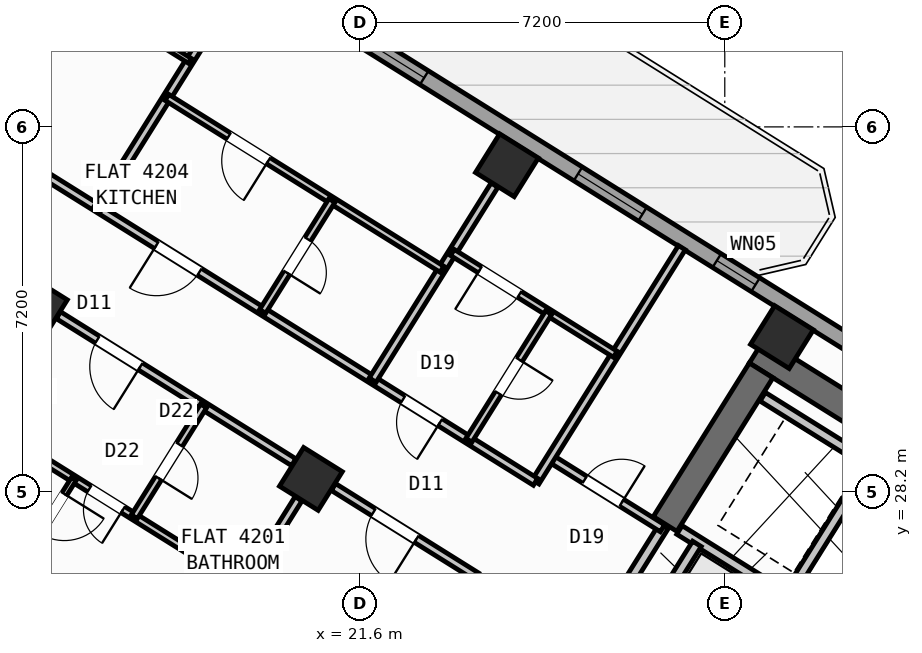
"""IFC4 building model, lengths in metres.
Left out: names, types, materials, properties, quantities, classifications, styles, units other than length and angle.
Written with IfcOpenShell. Run it as: python <this file> out.ifc"""

import sys

from ifc_helpers import new_model, si_unit, direction, frame, frame_2d, origin, origin_2d, place, context, subcontext, project, spatial, rectangle, hollow_rectangle, extrude, source, transform, mapped, element, fill, save


model = new_model("IFC4")
c1 = context("Model", 3, precision=1e-05, world=origin(), true_north=direction((0.0, 1.0)))
c2 = subcontext(c1, "Body", "Model", "MODEL_VIEW")
j1 = project(units=[si_unit("LENGTHUNIT", "METRE"), si_unit("PLANEANGLEUNIT", "RADIAN")], contexts=[c1])
p1 = place(None, origin())
s1 = spatial("IfcSite", under=j1, at=p1, CompositionType="ELEMENT")
p2 = place(p1, origin())
s2 = spatial("IfcBuilding", under=s1, at=p2, CompositionType="ELEMENT")
p3 = place(p2, frame((0.0, 0.0, 165.9)))
s3 = spatial("IfcBuildingStorey", under=s2, at=p3, CompositionType="ELEMENT", Elevation=165.9)
p4 = place(p3, frame((40.573, 24.01, 0.0), z_axis=(0.0, 0.0, 1.0), x_axis=(-0.848047359947, 0.529920442413, 0.0)))
e1 = element("IfcWall", 1, at=p4, inside=s3, PredefinedType="SHEAR", context=c2, shape_type="SweptSolid", body=[
    extrude(rectangle(XDim=13.14, YDim=0.55, at=frame_2d((6.57, 0.0))), origin(), (0.0, 0.0, 1.0), 3.32),
])
p5 = place(p3, frame((29.517, 30.594, 0.0), z_axis=(0.0, 0.0, 1.0), x_axis=(-0.529906864564, -0.848055844204, 0.0)))
e2 = element("IfcWall", 2, at=p5, inside=s3, PredefinedType="SHEAR", context=c2, shape_type="SweptSolid", body=[
    extrude(rectangle(XDim=3.575, YDim=0.55, at=frame_2d((1.788, 0.0))), origin(), (0.0, 0.0, 1.0), 3.32),
])
m1 = source(origin(), c2, "Body", "SweptSolid", [
    extrude(hollow_rectangle(XDim=0.9, YDim=0.9, WallThickness=0.036, at=origin_2d()), origin(), (0.0, 0.0, 1.0), 3.6),
])
for number, where, z_axis, x_axis in (
    (3, (29.928, 31.251, 0.0), (0.0, 0.0, 1.0), (-0.848, 0.53, 0.0)),
    (4, (24.5, 34.643, 0.0), (0.0, 0.0, 1.0), (-0.848, 0.53, 0.0)),
    (5, (20.632, 28.452, 0.0), (0.0, 0.0, 1.0), (-0.848, 0.53, 0.0)),
    (6, (15.205, 31.844, 0.0), (0.0, 0.0, 1.0), (-0.848, 0.53, 0.0)),
):
    element("IfcColumn", number, at=place(p3, frame(where, z_axis=z_axis, x_axis=x_axis)), inside=s3, PredefinedType="COLUMN", context=c2, shape_type="MappedRepresentation", body=[
        mapped(m1, transform((0.0, 0.0, 0.0), scale=1.0)),
    ])
p6 = place(p3, frame((14.138, 41.825, 0.0), z_axis=(0.0, 0.0, 1.0), x_axis=(0.848046498049, -0.529921821731, 0.0)))
e7 = element("IfcWall", 7, at=p6, inside=s3, PredefinedType="STANDARD", context=c2, shape_type="SweptSolid", body=[
    extrude(rectangle(XDim=31.588, YDim=0.32, at=frame_2d((15.794, 0.0))), origin(), (0.0, 0.0, 1.0), 3.32),
])
p7 = place(p6, frame((3.253, 0.0, 0.0)))
e8 = element("IfcOpeningElement", 8, at=p7, cuts=e7, PredefinedType="OPENING", context=c2, shape_type="SweptSolid", body=[
    extrude(rectangle(XDim=1.05, YDim=2.15, at=frame_2d((0.525, 1.075))), frame((0.0, 0.17, 0.0), z_axis=(0.0, -1.0, 0.0), x_axis=(1.0, 0.0, 0.0)), (0.0, 0.0, 1.0), 0.34),
])
p8 = place(p6, frame((0.863, 0.0, 0.85)))
e9 = element("IfcOpeningElement", 9, at=p8, cuts=e7, PredefinedType="OPENING", context=c2, shape_type="SweptSolid", body=[
    extrude(rectangle(XDim=1.8, YDim=1.5, at=frame_2d((0.9, 0.75))), frame((0.0, 0.17, 0.0), z_axis=(0.0, -1.0, 0.0), x_axis=(1.0, 0.0, 0.0)), (0.0, 0.0, 1.0), 0.34),
])
p9 = place(p6, frame((8.494, 0.0, 0.85)))
e10 = element("IfcOpeningElement", 10, at=p9, cuts=e7, PredefinedType="OPENING", context=c2, shape_type="SweptSolid", body=[
    extrude(rectangle(XDim=1.8, YDim=1.5, at=frame_2d((0.9, 0.75))), frame((0.0, 0.17, 0.0), z_axis=(0.0, -1.0, 0.0), x_axis=(1.0, 0.0, 0.0)), (0.0, 0.0, 1.0), 0.34),
])
p10 = place(p6, frame((13.874, 0.0, 0.85)))
e11 = element("IfcOpeningElement", 11, at=p10, cuts=e7, PredefinedType="OPENING", context=c2, shape_type="SweptSolid", body=[
    extrude(rectangle(XDim=1.5, YDim=1.5, at=frame_2d((0.75, 0.75))), frame((0.0, 0.17, 0.0), z_axis=(0.0, -1.0, 0.0), x_axis=(1.0, 0.0, 0.0)), (0.0, 0.0, 1.0), 0.34),
])
p11 = place(p6, frame((17.104, 0.0, 1.0)))
e12 = element("IfcOpeningElement", 12, at=p11, cuts=e7, PredefinedType="OPENING", context=c2, shape_type="SweptSolid", body=[
    extrude(rectangle(XDim=0.9, YDim=1.25, at=frame_2d((0.45, 0.625))), frame((0.0, 0.17, 0.0), z_axis=(0.0, -1.0, 0.0), x_axis=(1.0, 0.0, 0.0)), (0.0, 0.0, 1.0), 0.34),
])
p12 = place(p6, frame((22.144, 0.0, 1.0)))
e13 = element("IfcOpeningElement", 13, at=p12, cuts=e7, PredefinedType="OPENING", context=c2, shape_type="SweptSolid", body=[
    extrude(rectangle(XDim=0.9, YDim=1.25, at=frame_2d((0.45, 0.625))), frame((0.0, 0.17, 0.0), z_axis=(0.0, -1.0, 0.0), x_axis=(1.0, 0.0, 0.0)), (0.0, 0.0, 1.0), 0.34),
])
p13 = place(p6, frame((27.744, 0.0, 1.0)))
e14 = element("IfcOpeningElement", 14, at=p13, cuts=e7, PredefinedType="OPENING", context=c2, shape_type="SweptSolid", body=[
    extrude(rectangle(XDim=0.9, YDim=1.25, at=frame_2d((0.45, 0.625))), frame((0.0, 0.17, 0.0), z_axis=(0.0, -1.0, 0.0), x_axis=(1.0, 0.0, 0.0)), (0.0, 0.0, 1.0), 0.34),
])
p14 = place(p3, frame((31.822, 24.998, 0.0), z_axis=(0.0, 0.0, 1.0), x_axis=(-0.848036912365, 0.52993716162, 0.0)))
e15 = element("IfcWall", 15, at=p14, inside=s3, PredefinedType="STANDARD", context=c2, shape_type="SweptSolid", body=[
    extrude(rectangle(XDim=4.618, YDim=0.2, at=frame_2d((2.309, 0.0))), origin(), (0.0, 0.0, 1.0), 3.31),
])
p15 = place(p3, frame((28.25, 27.17, 0.0), z_axis=(0.0, 0.0, 1.0), x_axis=(-0.529905827651, -0.848056492117, 0.0)))
e16 = element("IfcWall", 16, at=p15, inside=s3, PredefinedType="STANDARD", context=c2, shape_type="SweptSolid", body=[
    extrude(rectangle(XDim=1.65, YDim=0.2, at=frame_2d((0.825, 0.0))), origin(), (0.0, 0.0, 1.0), 3.31),
])
p16 = place(p3, frame((31.645, 28.716, 0.0), z_axis=(0.0, 0.0, 1.0), x_axis=(-0.52986693015, -0.848080795876, 0.0)))
e17 = element("IfcWall", 17, at=p16, inside=s3, PredefinedType="STANDARD", context=c2, shape_type="SweptSolid", body=[
    extrude(rectangle(XDim=2.66, YDim=0.2, at=frame_2d((1.33, 0.0))), origin(), (0.0, 0.0, 1.0), 3.31),
])
p17 = place(p3, frame((33.363, 27.69, 0.0), z_axis=(0.0, 0.0, 1.0), x_axis=(-0.848047090064, 0.529920874315, 0.0)))
e18 = element("IfcWall", 18, at=p17, inside=s3, PredefinedType="STANDARD", context=c2, shape_type="SweptSolid", body=[
    extrude(rectangle(XDim=4.498, YDim=0.2, at=frame_2d((2.249, 0.0))), origin(), (0.0, 0.0, 1.0), 3.31),
])
p18 = place(p3, frame((27.596, 27.52, 0.0), z_axis=(0.0, 0.0, 1.0), x_axis=(-0.529865479138, -0.848081702443, 0.0)))
e19 = element("IfcWall", 19, at=p18, inside=s3, PredefinedType="STANDARD", context=c2, shape_type="SweptSolid", body=[
    extrude(rectangle(XDim=2.96, YDim=0.2, at=frame_2d((1.48, 0.0))), origin(), (0.0, 0.0, 1.0), 3.31),
])
p19 = place(p18, frame((1.76, 0.0, 0.0)))
e20 = element("IfcOpeningElement", 20, at=p19, cuts=e19, PredefinedType="OPENING", context=c2, shape_type="SweptSolid", body=[
    extrude(rectangle(XDim=0.86, YDim=2.05, at=frame_2d((0.43, 1.025))), frame((0.0, 0.11, 0.0), z_axis=(0.0, -1.0, 0.0), x_axis=(1.0, 0.0, 0.0)), (0.0, 0.0, 1.0), 0.22),
])
p20 = place(p3, frame((27.57, 27.478, 0.0), z_axis=(0.0, 0.0, 1.0), x_axis=(-0.848050851465, 0.529914854792, 0.0)))
e21 = element("IfcWall", 21, at=p20, inside=s3, PredefinedType="PARTITIONING", context=c2, shape_type="SweptSolid", body=[
    extrude(rectangle(XDim=2.61, YDim=0.16, at=frame_2d((1.305, 0.0))), origin(), (0.0, 0.0, 1.0), 3.31),
])
p21 = place(p20, frame((0.95, 0.0, 0.0)))
e22 = element("IfcOpeningElement", 22, at=p21, cuts=e21, PredefinedType="OPENING", context=c2, shape_type="SweptSolid", body=[
    extrude(rectangle(XDim=0.86, YDim=2.05, at=frame_2d((0.43, 1.025))), frame((0.0, 0.09, 0.0), z_axis=(0.0, -1.0, 0.0), x_axis=(1.0, 0.0, 0.0)), (0.0, 0.0, 1.0), 0.18),
])
p22 = place(p3, frame((27.953, 33.016, 0.0), z_axis=(0.0, 0.0, 1.0), x_axis=(-0.529906322364, -0.848056182997, 0.0)))
e23 = element("IfcWall", 23, at=p22, inside=s3, PredefinedType="PARTITIONING", context=c2, shape_type="SweptSolid", body=[
    extrude(rectangle(XDim=5.45, YDim=0.16, at=frame_2d((2.725, 0.0))), origin(), (0.0, 0.0, 1.0), 3.31),
])
p23 = place(p3, frame((25.065, 28.394, 0.0), z_axis=(0.0, 0.0, 1.0), x_axis=(-0.848048310262, 0.529918921593, 0.0)))
e24 = element("IfcWall", 24, at=p23, inside=s3, PredefinedType="PARTITIONING", context=c2, shape_type="SweptSolid", body=[
    extrude(rectangle(XDim=16.73, YDim=0.16, at=frame_2d((8.365, 0.0))), origin(), (0.0, 0.0, 1.0), 3.31),
])
p24 = place(p23, frame((2.22, 0.0, 0.0)))
e25 = element("IfcOpeningElement", 25, at=p24, cuts=e24, PredefinedType="OPENING", context=c2, shape_type="SweptSolid", body=[
    extrude(rectangle(XDim=0.86, YDim=2.05, at=frame_2d((0.43, 1.025))), frame((0.0, 0.09, 0.0), z_axis=(0.0, -1.0, 0.0), x_axis=(1.0, 0.0, 0.0)), (0.0, 0.0, 1.0), 0.18),
])
p25 = place(p23, frame((7.82, 0.0, 0.0)))
e26 = element("IfcOpeningElement", 26, at=p25, cuts=e24, PredefinedType="OPENING", context=c2, shape_type="SweptSolid", body=[
    extrude(rectangle(XDim=1.0, YDim=2.1, at=frame_2d((0.5, 1.05))), frame((0.0, 0.09, 0.0), z_axis=(0.0, -1.0, 0.0), x_axis=(1.0, 0.0, 0.0)), (0.0, 0.0, 1.0), 0.18),
])
p26 = place(p23, frame((12.95, 0.0, 0.0)))
e27 = element("IfcOpeningElement", 27, at=p26, cuts=e24, PredefinedType="OPENING", context=c2, shape_type="SweptSolid", body=[
    extrude(rectangle(XDim=1.0, YDim=2.1, at=frame_2d((0.5, 1.05))), frame((0.0, 0.09, 0.0), z_axis=(0.0, -1.0, 0.0), x_axis=(1.0, 0.0, 0.0)), (0.0, 0.0, 1.0), 0.18),
])
p27 = place(p3, frame((23.899, 26.529, 0.0), z_axis=(0.0, 0.0, 1.0), x_axis=(-0.848064240775, 0.529893426567, 0.0)))
e28 = element("IfcWall", 28, at=p27, inside=s3, PredefinedType="PARTITIONING", context=c2, shape_type="SweptSolid", body=[
    extrude(rectangle(XDim=3.328, YDim=0.16, at=frame_2d((1.664, 0.0))), origin(), (0.0, 0.0, 1.0), 2.795),
])
p28 = place(p27, frame((1.395, 0.0, 0.0)))
e29 = element("IfcOpeningElement", 29, at=p28, cuts=e28, PredefinedType="OPENING", context=c2, shape_type="SweptSolid", body=[
    extrude(rectangle(XDim=1.0, YDim=2.1, at=frame_2d((0.5, 1.05))), frame((0.0, 0.09, 0.0), z_axis=(0.0, -1.0, 0.0), x_axis=(1.0, 0.0, 0.0)), (0.0, 0.0, 1.0), 0.18),
])
p29 = place(p3, frame((20.293, 28.782, 0.0), z_axis=(0.0, 0.0, 1.0), x_axis=(-0.848040881926, 0.529930809241, 0.0)))
e30 = element("IfcWall", 30, at=p29, inside=s3, PredefinedType="PARTITIONING", context=c2, shape_type="SweptSolid", body=[
    extrude(rectangle(XDim=5.476, YDim=0.16, at=frame_2d((2.738, 0.0))), origin(), (0.0, 0.0, 1.0), 2.795),
])
p30 = place(p29, frame((3.568, 0.0, 0.0)))
e31 = element("IfcOpeningElement", 31, at=p30, cuts=e30, PredefinedType="OPENING", context=c2, shape_type="SweptSolid", body=[
    extrude(rectangle(XDim=1.0, YDim=2.1, at=frame_2d((0.5, 1.05))), frame((0.0, 0.09, 0.0), z_axis=(0.0, -1.0, 0.0), x_axis=(1.0, 0.0, 0.0)), (0.0, 0.0, 1.0), 0.18),
])
p31 = place(p3, frame((20.387, 28.06, 0.0), z_axis=(0.0, 0.0, 1.0), x_axis=(-0.529902564924, -0.848058530814, 0.0)))
e32 = element("IfcWall", 32, at=p31, inside=s3, PredefinedType="PARTITIONING", context=c2, shape_type="SweptSolid", body=[
    extrude(rectangle(XDim=6.376, YDim=0.16, at=frame_2d((3.188, 0.0))), origin(), (0.0, 0.0, 1.0), 2.795),
])
p32 = place(p3, frame((19.318, 26.349, 0.0), z_axis=(0.0, 0.0, 1.0), x_axis=(-0.848039019877, 0.529933789039, 0.0)))
e33 = element("IfcWall", 33, at=p32, inside=s3, PredefinedType="PLUMBINGWALL", context=c2, shape_type="SweptSolid", body=[
    extrude(rectangle(XDim=6.4, YDim=0.14, at=frame_2d((3.2, 0.0))), origin(), (0.0, 0.0, 1.0), 3.31),
])
p33 = place(p32, frame((2.824, 0.0, 0.0)))
e34 = element("IfcOpeningElement", 34, at=p33, cuts=e33, PredefinedType="OPENING", context=c2, shape_type="SweptSolid", body=[
    extrude(rectangle(XDim=0.78, YDim=2.05, at=frame_2d((0.39, 1.025))), frame((0.0, 0.08, 0.0), z_axis=(0.0, -1.0, 0.0), x_axis=(1.0, 0.0, 0.0)), (0.0, 0.0, 1.0), 0.16),
])
p34 = place(p3, frame((18.514, 29.894, 0.0), z_axis=(0.0, 0.0, 1.0), x_axis=(-0.529913878929, -0.848051461244, 0.0)))
e35 = element("IfcWall", 35, at=p34, inside=s3, PredefinedType="PLUMBINGWALL", context=c2, shape_type="SweptSolid", body=[
    extrude(rectangle(XDim=2.58, YDim=0.14, at=frame_2d((1.29, 0.0))), origin(), (0.0, 0.0, 1.0), 3.31),
])
p35 = place(p34, frame((0.9, 0.0, 0.0)))
e36 = element("IfcOpeningElement", 36, at=p35, cuts=e35, PredefinedType="OPENING", context=c2, shape_type="SweptSolid", body=[
    extrude(rectangle(XDim=0.78, YDim=2.05, at=frame_2d((0.39, 1.025))), frame((0.0, 0.08, 0.0), z_axis=(0.0, -1.0, 0.0), x_axis=(1.0, 0.0, 0.0)), (0.0, 0.0, 1.0), 0.16),
])
p36 = place(p3, frame((15.953, 28.452, 0.0), z_axis=(0.0, 0.0, 1.0), x_axis=(-0.529931645041, -0.848040359643, 0.0)))
e37 = element("IfcWall", 37, at=p36, inside=s3, PredefinedType="PARTITIONING", context=c2, shape_type="SweptSolid", body=[
    extrude(rectangle(XDim=11.74, YDim=0.11, at=frame_2d((5.87, 0.0))), origin(), (0.0, 0.0, 1.0), 3.31),
])
p37 = place(p36, frame((0.35, 0.0, 0.0)))
e38 = element("IfcOpeningElement", 38, at=p37, cuts=e37, PredefinedType="OPENING", context=c2, shape_type="SweptSolid", body=[
    extrude(rectangle(XDim=0.92, YDim=2.08, at=frame_2d((0.46, 1.04))), frame((0.0, 0.065, 0.0), z_axis=(0.0, -1.0, 0.0), x_axis=(1.0, 0.0, 0.0)), (0.0, 0.0, 1.0), 0.13),
])
p38 = place(p3, frame((24.256, 34.251, 0.0), z_axis=(0.0, 0.0, 1.0), x_axis=(-0.529926399231, -0.848043637673, 0.0)))
e39 = element("IfcWall", 39, at=p38, inside=s3, PredefinedType="PARTITIONING", context=c2, shape_type="SweptSolid", body=[
    extrude(rectangle(XDim=4.538, YDim=0.16, at=frame_2d((2.269, 0.0))), origin(), (0.0, 0.0, 1.0), 2.795),
])
p39 = place(p3, frame((26.639, 30.913, 0.0), z_axis=(0.0, 0.0, 1.0), x_axis=(-0.84803087207, 0.529946827537, 0.0)))
e40 = element("IfcWall", 40, at=p39, inside=s3, PredefinedType="PLUMBINGWALL", context=c2, shape_type="SweptSolid", body=[
    extrude(rectangle(XDim=3.79, YDim=0.14, at=frame_2d((1.895, 0.0))), origin(), (0.0, 0.0, 1.0), 3.31),
])
p40 = place(p39, frame((2.23, 0.0, 0.0)))
e41 = element("IfcOpeningElement", 41, at=p40, cuts=e40, PredefinedType="OPENING", context=c2, shape_type="SweptSolid", body=[
    extrude(rectangle(XDim=0.92, YDim=2.08, at=frame_2d((0.46, 1.04))), frame((0.0, 0.08, 0.0), z_axis=(0.0, -1.0, 0.0), x_axis=(1.0, 0.0, 0.0)), (0.0, 0.0, 1.0), 0.16),
])
p41 = place(p3, frame((25.324, 31.734, 0.0), z_axis=(0.0, 0.0, 1.0), x_axis=(-0.529873322326, -0.848076802116, 0.0)))
e42 = element("IfcWall", 42, at=p41, inside=s3, PredefinedType="PLUMBINGWALL", context=c2, shape_type="SweptSolid", body=[
    extrude(rectangle(XDim=2.97, YDim=0.14, at=frame_2d((1.485, 0.0))), origin(), (0.0, 0.0, 1.0), 2.935),
])
p42 = place(p41, frame((1.095, 0.0, 0.0)))
e43 = element("IfcOpeningElement", 43, at=p42, cuts=e42, PredefinedType="OPENING", context=c2, shape_type="SweptSolid", body=[
    extrude(rectangle(XDim=0.78, YDim=2.05, at=frame_2d((0.39, 1.025))), frame((0.0, 0.08, 0.0), z_axis=(0.0, -1.0, 0.0), x_axis=(1.0, 0.0, 0.0)), (0.0, 0.0, 1.0), 0.16),
])
p43 = place(p3, frame((18.828, 37.643, 0.0), z_axis=(0.0, 0.0, 1.0), x_axis=(-0.529926399231, -0.848043637673, 0.0)))
e44 = element("IfcWall", 44, at=p43, inside=s3, PredefinedType="PARTITIONING", context=c2, shape_type="SweptSolid", body=[
    extrude(rectangle(XDim=4.538, YDim=0.16, at=frame_2d((2.269, 0.0))), origin(), (0.0, 0.0, 1.0), 2.795),
])
p44 = place(p3, frame((23.218, 32.591, 0.0), z_axis=(0.0, 0.0, 1.0), x_axis=(-0.848056163074, 0.529906354247, 0.0)))
e45 = element("IfcWall", 45, at=p44, inside=s3, PredefinedType="PLUMBINGWALL", context=c2, shape_type="SweptSolid", body=[
    extrude(rectangle(XDim=6.4, YDim=0.14, at=frame_2d((3.2, 0.0))), origin(), (0.0, 0.0, 1.0), 3.31),
])
p45 = place(p44, frame((4.04, 0.0, 0.0)))
e46 = element("IfcOpeningElement", 46, at=p45, cuts=e45, PredefinedType="OPENING", context=c2, shape_type="SweptSolid", body=[
    extrude(rectangle(XDim=0.92, YDim=2.08, at=frame_2d((0.46, 1.04))), frame((0.0, 0.08, 0.0), z_axis=(0.0, -1.0, 0.0), x_axis=(1.0, 0.0, 0.0)), (0.0, 0.0, 1.0), 0.16),
])
p46 = place(p3, frame((21.047, 33.947, 0.0), z_axis=(0.0, 0.0, 1.0), x_axis=(-0.529913878929, -0.848051461244, 0.0)))
e47 = element("IfcWall", 47, at=p46, inside=s3, PredefinedType="PLUMBINGWALL", context=c2, shape_type="SweptSolid", body=[
    extrude(rectangle(XDim=2.58, YDim=0.14, at=frame_2d((1.29, 0.0))), origin(), (0.0, 0.0, 1.0), 3.31),
])
p47 = place(p46, frame((0.9, 0.0, 0.0)))
e48 = element("IfcOpeningElement", 48, at=p47, cuts=e47, PredefinedType="OPENING", context=c2, shape_type="SweptSolid", body=[
    extrude(rectangle(XDim=0.78, YDim=2.05, at=frame_2d((0.39, 1.025))), frame((0.0, 0.08, 0.0), z_axis=(0.0, -1.0, 0.0), x_axis=(1.0, 0.0, 0.0)), (0.0, 0.0, 1.0), 0.16),
])
p48 = place(p3, frame((18.242, 36.705, 0.0), z_axis=(0.0, 0.0, 1.0), x_axis=(-0.848048787466, 0.529918157905, 0.0)))
e49 = element("IfcWall", 49, at=p48, inside=s3, PredefinedType="PARTITIONING", context=c2, shape_type="SweptSolid", body=[
    extrude(rectangle(XDim=6.52, YDim=0.11, at=frame_2d((3.26, 0.0))), origin(), (0.0, 0.0, 1.0), 3.31),
])
p49 = place(p48, frame((2.8, 0.0, 0.0)))
e50 = element("IfcOpeningElement", 50, at=p49, cuts=e49, PredefinedType="OPENING", context=c2, shape_type="SweptSolid", body=[
    extrude(rectangle(XDim=0.92, YDim=2.08, at=frame_2d((0.46, 1.04))), frame((0.0, 0.065, 0.0), z_axis=(0.0, -1.0, 0.0), x_axis=(1.0, 0.0, 0.0)), (0.0, 0.0, 1.0), 0.13),
])
m2 = source(origin(), c2, "Body", "SweptSolid", [
    extrude(rectangle(XDim=1.8, YDim=1.5, at=frame_2d((0.9, 0.75))), frame((0.0, 0.03, 0.0), z_axis=(0.0, -1.0, 0.0), x_axis=(1.0, 0.0, 0.0)), (0.0, 0.0, 1.0), 0.06),
])
p50 = place(p9, origin())
e51 = element("IfcWindow", 51, at=p50, inside=s3, PartitioningType="SINGLE_PANEL", PredefinedType="WINDOW", context=c2, shape_type="MappedRepresentation", body=[
    mapped(m2, transform((0.0, 0.0, 0.0), scale=1.0)),
])
fill(e10, e51)
m3 = source(origin(), c2, "Body", "SweptSolid", [
    extrude(rectangle(XDim=1.5, YDim=1.5, at=frame_2d((0.75, 0.75))), frame((0.0, 0.03, 0.0), z_axis=(0.0, -1.0, 0.0), x_axis=(1.0, 0.0, 0.0)), (0.0, 0.0, 1.0), 0.06),
])
p51 = place(p10, origin())
e52 = element("IfcWindow", 52, at=p51, inside=s3, PartitioningType="SINGLE_PANEL", PredefinedType="WINDOW", context=c2, shape_type="MappedRepresentation", body=[
    mapped(m3, transform((0.0, 0.0, 0.0), scale=1.0)),
])
fill(e11, e52)
m4 = source(origin(), c2, "Body", "SweptSolid", [
    extrude(rectangle(XDim=0.9, YDim=1.25, at=frame_2d((0.45, 0.625))), frame((0.0, 0.03, 0.0), z_axis=(0.0, -1.0, 0.0), x_axis=(1.0, 0.0, 0.0)), (0.0, 0.0, 1.0), 0.06),
])
p52 = place(p11, origin())
e53 = element("IfcWindow", 53, at=p52, inside=s3, PartitioningType="SINGLE_PANEL", PredefinedType="WINDOW", context=c2, shape_type="MappedRepresentation", body=[
    mapped(m4, transform((0.0, 0.0, 0.0), scale=1.0)),
])
fill(e12, e53)
m5 = source(origin(), c2, "Body", "SweptSolid", [
    extrude(rectangle(XDim=0.86, YDim=2.05, at=frame_2d((0.43, 1.025))), frame((0.0, 0.025, 0.0), z_axis=(0.0, -1.0, 0.0), x_axis=(1.0, 0.0, 0.0)), (0.0, 0.0, 1.0), 0.05),
])
p53 = place(p21, frame((0.86, 0.0, 0.0), z_axis=(0.0, 0.0, 1.0), x_axis=(-1.0, 0.0, 0.0)))
e54 = element("IfcDoor", 54, at=p53, inside=s3, OperationType="SINGLE_SWING_RIGHT", PredefinedType="DOOR", context=c2, shape_type="MappedRepresentation", body=[
    mapped(m5, transform((0.0, 0.0, 0.0), scale=1.0)),
])
fill(e22, e54)
m6 = source(origin(), c2, "Body", "SweptSolid", [
    extrude(rectangle(XDim=1.0, YDim=2.1, at=frame_2d((0.5, 1.05))), frame((0.0, 0.025, 0.0), z_axis=(0.0, -1.0, 0.0), x_axis=(1.0, 0.0, 0.0)), (0.0, 0.0, 1.0), 0.05),
])
p54 = place(p28, origin())
e55 = element("IfcDoor", 55, at=p54, inside=s3, OperationType="SINGLE_SWING_LEFT", PredefinedType="DOOR", context=c2, shape_type="MappedRepresentation", body=[
    mapped(m6, transform((0.0, 0.0, 0.0), scale=1.0)),
])
fill(e29, e55)
m7 = source(origin(), c2, "Body", "SweptSolid", [
    extrude(rectangle(XDim=0.92, YDim=2.08, at=frame_2d((0.46, 1.04))), frame((0.0, 0.025, 0.0), z_axis=(0.0, -1.0, 0.0), x_axis=(1.0, 0.0, 0.0)), (0.0, 0.0, 1.0), 0.05),
])
p55 = place(p37, origin())
e56 = element("IfcDoor", 56, at=p55, inside=s3, OperationType="SINGLE_SWING_LEFT", PredefinedType="DOOR", context=c2, shape_type="MappedRepresentation", body=[
    mapped(m7, transform((0.0, 0.0, 0.0), scale=1.0)),
])
fill(e38, e56)
p56 = place(p30, origin())
e57 = element("IfcDoor", 57, at=p56, inside=s3, OperationType="SINGLE_SWING_LEFT", PredefinedType="DOOR", context=c2, shape_type="MappedRepresentation", body=[
    mapped(m6, transform((0.0, 0.0, 0.0), scale=1.0)),
])
fill(e31, e57)
m8 = source(origin(), c2, "Body", "SweptSolid", [
    extrude(rectangle(XDim=0.78, YDim=2.05, at=frame_2d((0.39, 1.025))), frame((0.0, 0.025, 0.0), z_axis=(0.0, -1.0, 0.0), x_axis=(1.0, 0.0, 0.0)), (0.0, 0.0, 1.0), 0.05),
])
p57 = place(p33, origin())
e58 = element("IfcDoor", 58, at=p57, inside=s3, OperationType="SINGLE_SWING_LEFT", PredefinedType="DOOR", context=c2, shape_type="MappedRepresentation", body=[
    mapped(m8, transform((0.0, 0.0, 0.0), scale=1.0)),
])
fill(e34, e58)
p58 = place(p35, origin())
e59 = element("IfcDoor", 59, at=p58, inside=s3, OperationType="SINGLE_SWING_RIGHT", PredefinedType="DOOR", context=c2, shape_type="MappedRepresentation", body=[
    mapped(m8, transform((0.0, 0.0, 0.0), scale=1.0)),
])
fill(e36, e59)
p59 = place(p24, origin())
e60 = element("IfcDoor", 60, at=p59, inside=s3, OperationType="SINGLE_SWING_LEFT", PredefinedType="DOOR", context=c2, shape_type="MappedRepresentation", body=[
    mapped(m5, transform((0.0, 0.0, 0.0), scale=1.0)),
])
fill(e25, e60)
p60 = place(p40, origin())
e61 = element("IfcDoor", 61, at=p60, inside=s3, OperationType="SINGLE_SWING_RIGHT", PredefinedType="DOOR", context=c2, shape_type="MappedRepresentation", body=[
    mapped(m7, transform((0.0, 0.0, 0.0), scale=1.0)),
])
fill(e41, e61)
p61 = place(p42, origin())
e62 = element("IfcDoor", 62, at=p61, inside=s3, OperationType="SINGLE_SWING_LEFT", PredefinedType="DOOR", context=c2, shape_type="MappedRepresentation", body=[
    mapped(m8, transform((0.0, 0.0, 0.0), scale=1.0)),
])
fill(e43, e62)
p62 = place(p25, origin())
e63 = element("IfcDoor", 63, at=p62, inside=s3, OperationType="SINGLE_SWING_RIGHT", PredefinedType="DOOR", context=c2, shape_type="MappedRepresentation", body=[
    mapped(m6, transform((0.0, 0.0, 0.0), scale=1.0)),
])
fill(e26, e63)
p63 = place(p45, origin())
e64 = element("IfcDoor", 64, at=p63, inside=s3, OperationType="SINGLE_SWING_LEFT", PredefinedType="DOOR", context=c2, shape_type="MappedRepresentation", body=[
    mapped(m7, transform((0.0, 0.0, 0.0), scale=1.0)),
])
fill(e46, e64)
p64 = place(p47, origin())
e65 = element("IfcDoor", 65, at=p64, inside=s3, OperationType="SINGLE_SWING_RIGHT", PredefinedType="DOOR", context=c2, shape_type="MappedRepresentation", body=[
    mapped(m8, transform((0.0, 0.0, 0.0), scale=1.0)),
])
fill(e48, e65)
save(model, sys.argv[1])
